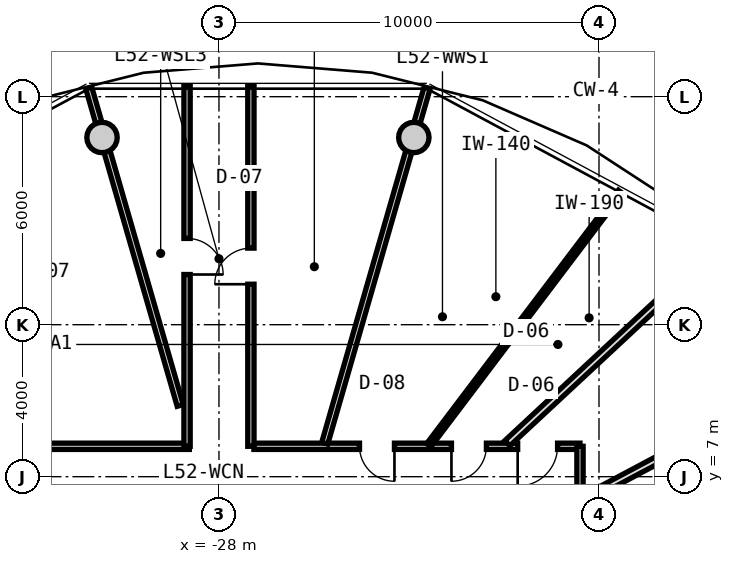
"""IFC4 building model, lengths in metres.
Left out: names, types, materials, properties, quantities, classifications, styles, units other than length and angle.
Written with IfcOpenShell. Run it as: python <this file> out.ifc"""

import sys

from ifc_helpers import new_model, si_unit, direction, frame, frame_2d, origin, origin_2d, place, context, subcontext, project, spatial, rectangle, circle, extrude, source, transform, mapped, element, fill, save


model = new_model("IFC4")
c1 = context("Model", 3, precision=1e-05, world=origin(), true_north=direction((0.0, 1.0)))
c2 = subcontext(c1, "Body", "Model", "MODEL_VIEW")
j1 = project(units=[si_unit("LENGTHUNIT", "METRE"), si_unit("PLANEANGLEUNIT", "RADIAN")], contexts=[c1])
p1 = place(None, origin())
s1 = spatial("IfcSite", under=j1, at=p1, CompositionType="ELEMENT")
p2 = place(p1, origin())
s2 = spatial("IfcBuilding", under=s1, at=p2, CompositionType="ELEMENT")
p3 = place(p2, frame((0.0, 0.0, 167.85)))
s3 = spatial("IfcBuildingStorey", under=s2, at=p3, CompositionType="ELEMENT", Elevation=167.85)
m1 = source(origin(), c2, "Body", "SweptSolid", [
    extrude(circle(Radius=0.4, at=origin_2d()), origin(), (0.0, 0.0, 1.0), 3.05),
])
for number, where, z_axis, x_axis in (
    (1, (-22.873, 15.926, 0.0), (0.0, 0.0, 1.0), (1.0, 0.0, 0.0)),
    (2, (-31.077, 15.926, 0.0), (0.0, 0.0, 1.0), (1.0, 0.0, 0.0)),
):
    element("IfcColumn", number, at=place(p3, frame(where, z_axis=z_axis, x_axis=x_axis)), inside=s3, PredefinedType="COLUMN", context=c2, shape_type="MappedRepresentation", body=[
        mapped(m1, transform((0.0, 0.0, 0.0), x_axis=(1.0, 0.0, 0.0), y_axis=(0.0, 1.0, 0.0), z_axis=(0.0, 0.0, 1.0), scale=1.0)),
    ])
m2 = source(origin(), c2, "Body", "SweptSolid", [
    extrude(rectangle(XDim=8.719, YDim=0.165, at=frame_2d((4.36, 0.0))), origin(), (0.0, 0.0, 1.0), 2.795),
])
p4 = place(p3, frame((-37.5, 7.8, 0.0), z_axis=(0.0, 0.0, 1.0), x_axis=(1.0, 0.0, 0.0)))
e3 = element("IfcWall", 3, at=p4, inside=s3, PredefinedType="PARTITIONING", context=c2, shape_type="MappedRepresentation", body=[
    mapped(m2, transform((0.0, 0.0, 0.0), x_axis=(1.0, 0.0, 0.0), y_axis=(0.0, 1.0, 0.0), z_axis=(0.0, 0.0, 1.0), scale=1.0)),
])
p5 = place(p4, frame((3.735, 0.0, 0.0)))
e4 = element("IfcOpeningElement", 4, at=p5, cuts=e3, PredefinedType="OPENING", context=c2, shape_type="SweptSolid", body=[
    extrude(rectangle(XDim=1.25, YDim=2.2, at=frame_2d((0.625, 1.1))), frame((0.0, 0.093, 0.0), z_axis=(0.0, -1.0, 0.0), x_axis=(1.0, 0.0, 0.0)), (0.0, 0.0, 1.0), 0.185),
])
m3 = source(origin(), c2, "Body", "SweptSolid", [
    extrude(rectangle(XDim=8.58, YDim=0.165, at=frame_2d((4.29, 0.0))), origin(), (0.0, 0.0, 1.0), 2.795),
])
p6 = place(p3, frame((-27.08, 7.8, 0.0), z_axis=(0.0, 0.0, 1.0), x_axis=(1.0, 0.0, 0.0)))
e5 = element("IfcWall", 5, at=p6, inside=s3, PredefinedType="PARTITIONING", context=c2, shape_type="MappedRepresentation", body=[
    mapped(m3, transform((0.0, 0.0, 0.0), x_axis=(1.0, 0.0, 0.0), y_axis=(0.0, 1.0, 0.0), z_axis=(0.0, 0.0, 1.0), scale=1.0)),
])
p7 = place(p6, frame((6.94, 0.0, 0.0)))
e6 = element("IfcOpeningElement", 6, at=p7, cuts=e5, PredefinedType="OPENING", context=c2, shape_type="SweptSolid", body=[
    extrude(rectangle(XDim=1.05, YDim=2.15, at=frame_2d((0.525, 1.075))), frame((0.0, 0.093, 0.0), z_axis=(0.0, -1.0, 0.0), x_axis=(1.0, 0.0, 0.0)), (0.0, 0.0, 1.0), 0.185),
])
p8 = place(p6, frame((5.197, 0.0, 0.0)))
e7 = element("IfcOpeningElement", 7, at=p8, cuts=e5, PredefinedType="OPENING", context=c2, shape_type="SweptSolid", body=[
    extrude(rectangle(XDim=0.92, YDim=2.1, at=frame_2d((0.46, 1.05))), frame((0.0, 0.093, 0.0), z_axis=(0.0, -1.0, 0.0), x_axis=(1.0, 0.0, 0.0)), (0.0, 0.0, 1.0), 0.185),
])
p9 = place(p6, frame((2.778, 0.0, 0.0)))
e8 = element("IfcOpeningElement", 8, at=p9, cuts=e5, PredefinedType="OPENING", context=c2, shape_type="SweptSolid", body=[
    extrude(rectangle(XDim=0.92, YDim=2.1, at=frame_2d((0.46, 1.05))), frame((0.0, 0.093, 0.0), z_axis=(0.0, -1.0, 0.0), x_axis=(1.0, 0.0, 0.0)), (0.0, 0.0, 1.0), 0.185),
])
m4 = source(origin(), c2, "Body", "SweptSolid", [
    extrude(rectangle(XDim=6.88, YDim=0.165, at=frame_2d((3.44, 0.0))), origin(), (0.0, 0.0, 1.0), 2.795),
])
p10 = place(p3, frame((-18.5, 7.8, 0.0), z_axis=(0.0, 0.0, 1.0), x_axis=(0.0, -1.0, 0.0)))
e9 = element("IfcWall", 9, at=p10, inside=s3, PredefinedType="PARTITIONING", context=c2, shape_type="MappedRepresentation", body=[
    mapped(m4, transform((0.0, 0.0, 0.0), x_axis=(1.0, 0.0, 0.0), y_axis=(0.0, 1.0, 0.0), z_axis=(0.0, 0.0, 1.0), scale=1.0)),
])
p11 = place(p10, frame((1.515, 0.0, 0.0)))
e10 = element("IfcOpeningElement", 10, at=p11, cuts=e9, PredefinedType="OPENING", context=c2, shape_type="SweptSolid", body=[
    extrude(rectangle(XDim=1.05, YDim=2.15, at=frame_2d((0.525, 1.075))), frame((0.0, 0.093, 0.0), z_axis=(0.0, -1.0, 0.0), x_axis=(1.0, 0.0, 0.0)), (0.0, 0.0, 1.0), 0.185),
])
m5 = source(origin(), c2, "Body", "SweptSolid", [
    extrude(rectangle(XDim=9.73, YDim=0.165, at=frame_2d((4.865, 0.0))), origin(), (0.0, 0.0, 1.0), 2.345),
])
p12 = place(p3, frame((-25.217, 7.88, 0.0), z_axis=(0.0, 0.0, 1.0), x_axis=(0.27679492614, 0.960929013436, 0.0)))
e11 = element("IfcWall", 11, at=p12, inside=s3, PredefinedType="PARTITIONING", context=c2, shape_type="MappedRepresentation", body=[
    mapped(m5, transform((0.0, 0.0, 0.0), x_axis=(1.0, 0.0, 0.0), y_axis=(0.0, 1.0, 0.0), z_axis=(0.0, 0.0, 1.0), scale=1.0)),
])
m6 = source(origin(), c2, "Body", "SweptSolid", [
    extrude(rectangle(XDim=8.695, YDim=0.165, at=frame_2d((4.348, 0.0))), origin(), (0.0, 0.0, 1.0), 2.345),
])
p13 = place(p3, frame((-29.02, 8.875, 0.0), z_axis=(0.0, 0.0, 1.0), x_axis=(-0.276797231892, 0.960928349263, 0.0)))
e12 = element("IfcWall", 12, at=p13, inside=s3, PredefinedType="PARTITIONING", context=c2, shape_type="MappedRepresentation", body=[
    mapped(m6, transform((0.0, 0.0, 0.0), x_axis=(1.0, 0.0, 0.0), y_axis=(0.0, 1.0, 0.0), z_axis=(0.0, 0.0, 1.0), scale=1.0)),
])
m7 = source(origin(), c2, "Body", "SweptSolid", [
    extrude(rectangle(XDim=9.48, YDim=0.165, at=frame_2d((4.74, 0.0))), origin(), (0.0, 0.0, 1.0), 2.795),
])
p14 = place(p3, frame((-28.84, 7.8, 0.0), z_axis=(0.0, 0.0, 1.0), x_axis=(0.0, 1.0, 0.0)))
e13 = element("IfcWall", 13, at=p14, inside=s3, PredefinedType="PARTITIONING", context=c2, shape_type="MappedRepresentation", body=[
    mapped(m7, transform((0.0, 0.0, 0.0), x_axis=(1.0, 0.0, 0.0), y_axis=(0.0, 1.0, 0.0), z_axis=(0.0, 0.0, 1.0), scale=1.0)),
])
p15 = place(p14, frame((4.521, 0.0, 0.0)))
e14 = element("IfcOpeningElement", 14, at=p15, cuts=e13, PredefinedType="OPENING", context=c2, shape_type="SweptSolid", body=[
    extrude(rectangle(XDim=0.95, YDim=2.1, at=frame_2d((0.475, 1.05))), frame((0.0, 0.093, 0.0), z_axis=(0.0, -1.0, 0.0), x_axis=(1.0, 0.0, 0.0)), (0.0, 0.0, 1.0), 0.185),
])
p16 = place(p3, frame((-27.16, 17.28, 0.0), z_axis=(0.0, 0.0, 1.0), x_axis=(0.0, -1.0, 0.0)))
e15 = element("IfcWall", 15, at=p16, inside=s3, PredefinedType="PARTITIONING", context=c2, shape_type="MappedRepresentation", body=[
    mapped(m7, transform((0.0, 0.0, 0.0), x_axis=(1.0, 0.0, 0.0), y_axis=(0.0, 1.0, 0.0), z_axis=(0.0, 0.0, 1.0), scale=1.0)),
])
p17 = place(p16, frame((4.265, 0.0, 0.0)))
e16 = element("IfcOpeningElement", 16, at=p17, cuts=e15, PredefinedType="OPENING", context=c2, shape_type="SweptSolid", body=[
    extrude(rectangle(XDim=0.95, YDim=2.1, at=frame_2d((0.475, 1.05))), frame((0.0, 0.093, 0.0), z_axis=(0.0, -1.0, 0.0), x_axis=(1.0, 0.0, 0.0)), (0.0, 0.0, 1.0), 0.185),
])
m8 = source(origin(), c2, "Body", "SweptSolid", [
    extrude(rectangle(XDim=7.648, YDim=0.19, at=frame_2d((3.824, 0.0))), origin(), (0.0, 0.0, 1.0), 2.345),
])
p18 = place(p3, frame((-20.413, 7.88, 0.0), z_axis=(0.0, 0.0, 1.0), x_axis=(0.732182665826, 0.681108320213, 0.0)))
e17 = element("IfcWall", 17, at=p18, inside=s3, PredefinedType="PARTITIONING", context=c2, shape_type="MappedRepresentation", body=[
    mapped(m8, transform((0.0, 0.0, 0.0), x_axis=(1.0, 0.0, 0.0), y_axis=(0.0, 1.0, 0.0), z_axis=(0.0, 0.0, 1.0), scale=1.0)),
])
m9 = source(origin(), c2, "Body", "SweptSolid", [
    extrude(rectangle(XDim=6.499, YDim=0.19, at=frame_2d((3.25, 0.0))), origin(), (0.0, 0.0, 1.0), 2.795),
])
p19 = place(p3, frame((-18.324, 6.449, 0.0), z_axis=(0.0, 0.0, 1.0), x_axis=(0.882715595921, 0.469907625729, 0.0)))
e18 = element("IfcWall", 18, at=p19, inside=s3, PredefinedType="PARTITIONING", context=c2, shape_type="MappedRepresentation", body=[
    mapped(m9, transform((0.0, 0.0, 0.0), x_axis=(1.0, 0.0, 0.0), y_axis=(0.0, 1.0, 0.0), z_axis=(0.0, 0.0, 1.0), scale=1.0)),
])
m10 = source(origin(), c2, "Body", "SweptSolid", [
    extrude(rectangle(XDim=8.359, YDim=0.14, at=frame_2d((4.18, 0.0))), origin(), (0.0, 0.0, 1.0), 2.795),
])
p20 = place(p3, frame((-22.477, 7.83, 0.0), z_axis=(0.0, 0.0, 1.0), x_axis=(0.603265985309, 0.797540062297, 0.0)))
e19 = element("IfcWall", 19, at=p20, inside=s3, PredefinedType="PARTITIONING", context=c2, shape_type="MappedRepresentation", body=[
    mapped(m10, transform((0.0, 0.0, 0.0), x_axis=(1.0, 0.0, 0.0), y_axis=(0.0, 1.0, 0.0), z_axis=(0.0, 0.0, 1.0), scale=1.0)),
])
m11 = source(origin(), c2, "Body", "SweptSolid", [
    extrude(rectangle(XDim=0.95, YDim=2.1, at=frame_2d((0.475, 1.05))), frame((0.0, 0.025, 0.0), z_axis=(0.0, -1.0, 0.0), x_axis=(1.0, 0.0, 0.0)), (0.0, 0.0, 1.0), 0.05),
])
p21 = place(p15, frame((0.95, 0.0, 0.0), z_axis=(0.0, 0.0, 1.0), x_axis=(-1.0, 0.0, 0.0)))
e20 = element("IfcDoor", 20, at=p21, inside=s3, OperationType="SINGLE_SWING_RIGHT", PredefinedType="DOOR", context=c2, shape_type="MappedRepresentation", body=[
    mapped(m11, transform((0.0, 0.0, 0.0), x_axis=(1.0, 0.0, 0.0), y_axis=(0.0, 1.0, 0.0), z_axis=(0.0, 0.0, 1.0), scale=1.0)),
])
fill(e14, e20)
p22 = place(p17, frame((0.95, 0.0, 0.0), z_axis=(0.0, 0.0, 1.0), x_axis=(-1.0, 0.0, 0.0)))
e21 = element("IfcDoor", 21, at=p22, inside=s3, OperationType="SINGLE_SWING_LEFT", PredefinedType="DOOR", context=c2, shape_type="MappedRepresentation", body=[
    mapped(m11, transform((0.0, 0.0, 0.0), x_axis=(1.0, 0.0, 0.0), y_axis=(0.0, 1.0, 0.0), z_axis=(0.0, 0.0, 1.0), scale=1.0)),
])
fill(e16, e21)
m12 = source(origin(), c2, "Body", "SweptSolid", [
    extrude(rectangle(XDim=1.05, YDim=2.15, at=frame_2d((0.525, 1.075))), frame((0.0, 0.025, 0.0), z_axis=(0.0, -1.0, 0.0), x_axis=(1.0, 0.0, 0.0)), (0.0, 0.0, 1.0), 0.05),
])
p23 = place(p7, frame((1.05, 0.0, 0.0), z_axis=(0.0, 0.0, 1.0), x_axis=(-1.0, 0.0, 0.0)))
e22 = element("IfcDoor", 22, at=p23, inside=s3, OperationType="SINGLE_SWING_RIGHT", PredefinedType="DOOR", context=c2, shape_type="MappedRepresentation", body=[
    mapped(m12, transform((0.0, 0.0, 0.0), x_axis=(1.0, 0.0, 0.0), y_axis=(0.0, 1.0, 0.0), z_axis=(0.0, 0.0, 1.0), scale=1.0)),
])
fill(e6, e22)
m13 = source(origin(), c2, "Body", "SweptSolid", [
    extrude(rectangle(XDim=0.92, YDim=2.1, at=frame_2d((0.46, 1.05))), frame((0.0, 0.025, 0.0), z_axis=(0.0, -1.0, 0.0), x_axis=(1.0, 0.0, 0.0)), (0.0, 0.0, 1.0), 0.05),
])
p24 = place(p8, frame((0.92, 0.0, 0.0), z_axis=(0.0, 0.0, 1.0), x_axis=(-1.0, 0.0, 0.0)))
e23 = element("IfcDoor", 23, at=p24, inside=s3, OperationType="SINGLE_SWING_RIGHT", PredefinedType="DOOR", context=c2, shape_type="MappedRepresentation", body=[
    mapped(m13, transform((0.0, 0.0, 0.0), x_axis=(1.0, 0.0, 0.0), y_axis=(0.0, 1.0, 0.0), z_axis=(0.0, 0.0, 1.0), scale=1.0)),
])
fill(e7, e23)
p25 = place(p9, frame((0.92, 0.0, 0.0), z_axis=(0.0, 0.0, 1.0), x_axis=(-1.0, 0.0, 0.0)))
e24 = element("IfcDoor", 24, at=p25, inside=s3, OperationType="SINGLE_SWING_LEFT", PredefinedType="DOOR", context=c2, shape_type="MappedRepresentation", body=[
    mapped(m13, transform((0.0, 0.0, 0.0), x_axis=(1.0, 0.0, 0.0), y_axis=(0.0, 1.0, 0.0), z_axis=(0.0, 0.0, 1.0), scale=1.0)),
])
fill(e8, e24)
save(model, sys.argv[1])
